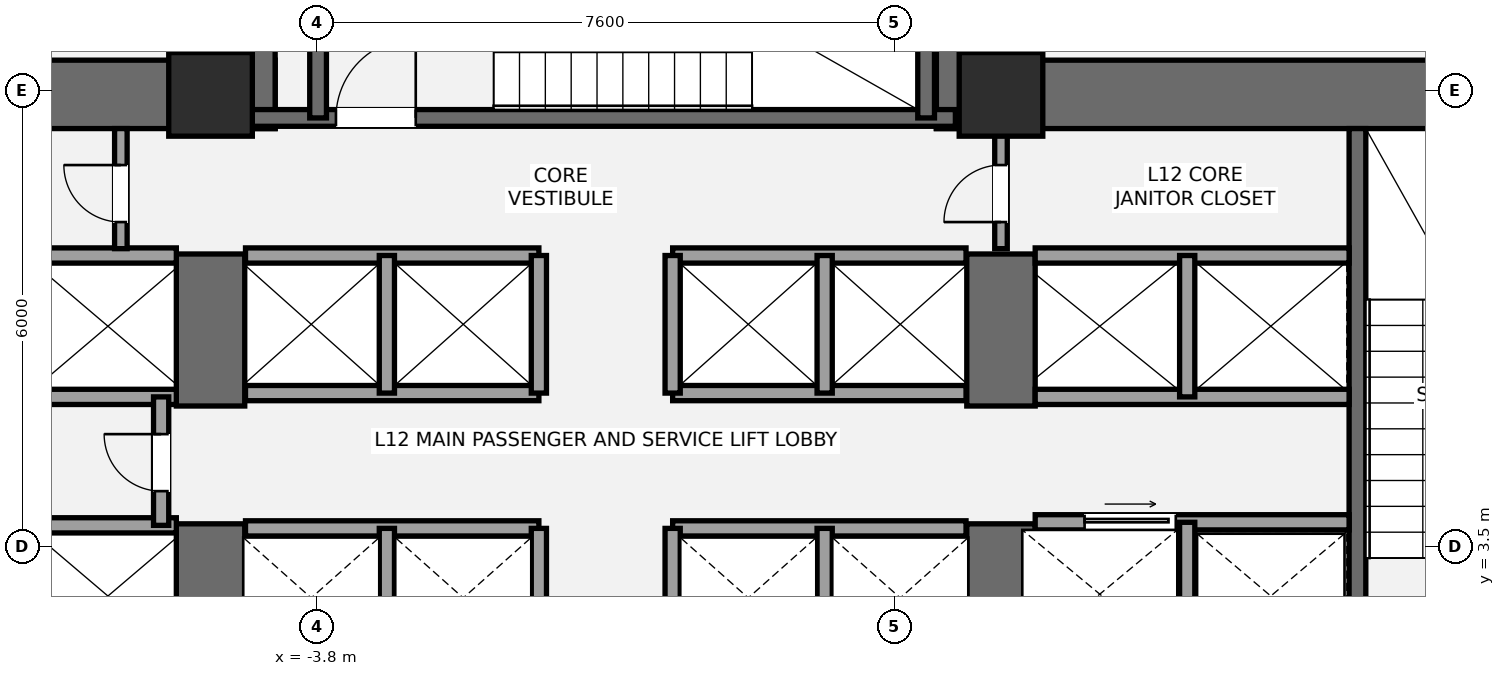
"""IFC4 building model, lengths in metres.
Left out: names, types, materials, properties, quantities, classifications, styles, units other than length and angle.
Written with IfcOpenShell. Run it as: python <this file> out.ifc"""

import sys

from ifc_helpers import new_model, si_unit, direction, frame, frame_2d, origin, origin_2d, place, context, subcontext, project, spatial, rectangle, extrude, element, fill, save


model = new_model("IFC4")
c1 = context("Model", 3, precision=1e-05, world=origin(), true_north=direction((0.0, 1.0)))
c2 = subcontext(c1, "Body", "Model", "MODEL_VIEW")
j1 = project(units=[si_unit("LENGTHUNIT", "METRE"), si_unit("PLANEANGLEUNIT", "RADIAN")], contexts=[c1])
p1 = place(None, origin())
s1 = spatial("IfcSite", under=j1, at=p1, CompositionType="ELEMENT")
p2 = place(p1, origin())
s2 = spatial("IfcBuilding", under=s1, at=p2, CompositionType="ELEMENT")
p3 = place(p2, frame((0.0, 0.0, 48.6)))
s3 = spatial("IfcBuildingStorey", under=s2, at=p3, CompositionType="ELEMENT", Elevation=48.6)
p4 = place(p3, frame((-14.05, 9.45, 0.0), z_axis=(0.0, 0.0, 1.0), x_axis=(1.0, 0.0, 0.0)))
e1 = element("IfcWall", 1, at=p4, inside=s3, PredefinedType="SHEAR", context=c2, shape_type="SweptSolid", body=[
    extrude(rectangle(XDim=9.7, YDim=0.9, at=frame_2d((4.85, 0.0))), origin(), (0.0, 0.0, 1.0), 3.6),
])
p5 = place(p3, frame((-5.2, 0.95, 0.0), z_axis=(0.0, 0.0, 1.0), x_axis=(0.0, 1.0, 0.0)))
e2 = element("IfcWall", 2, at=p5, inside=s3, PredefinedType="SHEAR", context=c2, shape_type="SweptSolid", body=[
    extrude(rectangle(XDim=2.85, YDim=0.9, at=frame_2d((1.425, 0.0))), origin(), (0.0, 0.0, 1.0), 3.6),
])
p6 = place(p3, frame((-5.2, 5.35, 0.0), z_axis=(0.0, 0.0, 1.0), x_axis=(0.0, 1.0, 0.0)))
e3 = element("IfcWall", 3, at=p6, inside=s3, PredefinedType="SHEAR", context=c2, shape_type="SweptSolid", body=[
    extrude(rectangle(XDim=2.0, YDim=0.9, at=frame_2d((1.0, 0.0))), origin(), (0.0, 0.0, 1.0), 3.6),
])
p7 = place(p3, frame((4.35, 9.45, 0.0), z_axis=(0.0, 0.0, 1.0), x_axis=(1.0, 0.0, 0.0)))
e4 = element("IfcWall", 4, at=p7, inside=s3, PredefinedType="SHEAR", context=c2, shape_type="SweptSolid", body=[
    extrude(rectangle(XDim=9.7, YDim=0.9, at=frame_2d((4.85, 0.0))), origin(), (0.0, 0.0, 1.0), 3.6),
])
p8 = place(p3, frame((5.2, 0.95, 0.0), z_axis=(0.0, 0.0, 1.0), x_axis=(0.0, 1.0, 0.0)))
e5 = element("IfcWall", 5, at=p8, inside=s3, PredefinedType="SHEAR", context=c2, shape_type="SweptSolid", body=[
    extrude(rectangle(XDim=2.85, YDim=0.9, at=frame_2d((1.425, 0.0))), origin(), (0.0, 0.0, 1.0), 3.6),
])
p9 = place(p3, frame((5.2, 5.35, 0.0), z_axis=(0.0, 0.0, 1.0), x_axis=(0.0, 1.0, 0.0)))
e6 = element("IfcWall", 6, at=p9, inside=s3, PredefinedType="SHEAR", context=c2, shape_type="SweptSolid", body=[
    extrude(rectangle(XDim=2.0, YDim=0.9, at=frame_2d((1.0, 0.0))), origin(), (0.0, 0.0, 1.0), 3.6),
])
p10 = place(p3, frame((9.89, 1.85, 0.0), z_axis=(0.0, 0.0, 1.0), x_axis=(0.0, 1.0, 0.0)))
e7 = element("IfcWall", 7, at=p10, inside=s3, PredefinedType="SHEAR", context=c2, shape_type="SweptSolid", body=[
    extrude(rectangle(XDim=7.15, YDim=0.22, at=frame_2d((3.575, 0.0))), origin(), (0.0, 0.0, 1.0), 3.6),
])
for number, where, z_axis, x_axis in (
    (8, (-4.8, 9.0, 0.0), (0.0, 0.0, 1.0), (0.0, 1.0, 0.0)),
    (9, (4.8, 9.0, 0.0), (0.0, 0.0, 1.0), (0.0, 1.0, 0.0)),
):
    element("IfcWall", number, at=place(p3, frame(where, z_axis=z_axis, x_axis=x_axis)), inside=s3, PredefinedType="SHEAR", context=c2, shape_type="SweptSolid", body=[
        extrude(rectangle(XDim=4.3, YDim=0.9, at=frame_2d((2.15, 0.0))), origin(), (0.0, 0.0, 1.0), 3.6),
    ])
p11 = place(p3, frame((-4.7, 9.14, 0.0), z_axis=(0.0, 0.0, 1.0), x_axis=(1.0, 0.0, 0.0)))
e10 = element("IfcWall", 10, at=p11, inside=s3, PredefinedType="SHEAR", context=c2, shape_type="SweptSolid", body=[
    extrude(rectangle(XDim=9.3, YDim=0.22, at=frame_2d((4.65, 0.0))), origin(), (0.0, 0.0, 1.0), 3.6),
])
p12 = place(p11, frame((1.15, 0.0, 0.0)))
e11 = element("IfcOpeningElement", 11, at=p12, cuts=e10, PredefinedType="OPENING", context=c2, shape_type="SweptSolid", body=[
    extrude(rectangle(XDim=1.05, YDim=2.15, at=frame_2d((0.525, 1.075))), frame((0.0, 0.12, 0.0), z_axis=(0.0, -1.0, 0.0), x_axis=(1.0, 0.0, 0.0)), (0.0, 0.0, 1.0), 0.24),
])
for number, where, z_axis, x_axis in (
    (12, (-3.785, 9.14, 0.0), (0.0, 0.0, 1.0), (0.0, 1.0, 0.0)),
    (13, (4.215, 9.14, 0.0), (0.0, 0.0, 1.0), (0.0, 1.0, 0.0)),
):
    element("IfcWall", number, at=place(p3, frame(where, z_axis=z_axis, x_axis=x_axis)), inside=s3, PredefinedType="SHEAR", context=c2, shape_type="SweptSolid", body=[
        extrude(rectangle(XDim=3.26, YDim=0.22, at=frame_2d((1.63, 0.0))), origin(), (0.0, 0.0, 1.0), 3.6),
    ])
for number, where, z_axis, x_axis in (
    (14, (-5.2, 9.45, 0.0), (0.0, 0.0, 1.0), (1.0, 0.0, 0.0)),
    (15, (5.2, 9.45, 0.0), (0.0, 0.0, 1.0), (1.0, 0.0, 0.0)),
):
    element("IfcColumn", number, at=place(p3, frame(where, z_axis=z_axis, x_axis=x_axis)), inside=s3, PredefinedType="COLUMN", context=c2, shape_type="SweptSolid", body=[
        extrude(rectangle(XDim=1.1, YDim=1.1, at=origin_2d()), origin(), (0.0, 0.0, 1.0), 3.6),
    ])
for number, where, z_axis, x_axis in (
    (16, (-9.78, 3.78, 0.0), (0.0, 0.0, 1.0), (1.0, 0.0, 0.0)),
    (17, (-9.78, 5.47, 0.0), (0.0, 0.0, 1.0), (1.0, 0.0, 0.0)),
    (18, (-9.78, 7.33, 0.0), (0.0, 0.0, 1.0), (1.0, 0.0, 0.0)),
):
    element("IfcWall", number, at=place(p3, frame(where, z_axis=z_axis, x_axis=x_axis)), inside=s3, PredefinedType="SOLIDWALL", context=c2, shape_type="SweptSolid", body=[
        extrude(rectangle(XDim=4.13, YDim=0.2, at=frame_2d((2.065, 0.0))), origin(), (0.0, 0.0, 1.0), 3.4),
    ])
p13 = place(p3, frame((-5.85, 3.78, 0.0), z_axis=(0.0, 0.0, 1.0), x_axis=(0.0, 1.0, 0.0)))
e19 = element("IfcWall", 19, at=p13, inside=s3, PredefinedType="SOLIDWALL", context=c2, shape_type="SweptSolid", body=[
    extrude(rectangle(XDim=1.69, YDim=0.2, at=frame_2d((0.845, 0.0))), origin(), (0.0, 0.0, 1.0), 3.4),
])
p14 = place(p13, frame((0.45, 0.0, 0.0)))
e20 = element("IfcOpeningElement", 20, at=p14, cuts=e19, PredefinedType="OPENING", context=c2, shape_type="SweptSolid", body=[
    extrude(rectangle(XDim=0.75, YDim=2.1, at=frame_2d((0.375, 1.05))), frame((0.0, 0.11, 0.0), z_axis=(0.0, -1.0, 0.0), x_axis=(1.0, 0.0, 0.0)), (0.0, 0.0, 1.0), 0.22),
])
p15 = place(p3, frame((5.65, 3.82, 0.0), z_axis=(0.0, 0.0, 1.0), x_axis=(1.0, 0.0, 0.0)))
e21 = element("IfcWall", 21, at=p15, inside=s3, PredefinedType="SOLIDWALL", context=c2, shape_type="SweptSolid", body=[
    extrude(rectangle(XDim=4.13, YDim=0.2, at=frame_2d((2.065, 0.0))), origin(), (0.0, 0.0, 1.0), 3.4),
])
p16 = place(p15, frame((0.65, 0.0, 0.0)))
e22 = element("IfcOpeningElement", 22, at=p16, cuts=e21, PredefinedType="OPENING", context=c2, shape_type="SweptSolid", body=[
    extrude(rectangle(XDim=1.2, YDim=2.2, at=frame_2d((0.6, 1.1))), frame((0.0, 0.11, 0.0), z_axis=(0.0, -1.0, 0.0), x_axis=(1.0, 0.0, 0.0)), (0.0, 0.0, 1.0), 0.22),
])
p17 = place(p3, frame((7.65, 1.85, 0.0), z_axis=(0.0, 0.0, 1.0), x_axis=(0.0, 1.0, 0.0)))
e23 = element("IfcWall", 23, at=p17, inside=s3, PredefinedType="SOLIDWALL", context=c2, shape_type="SweptSolid", body=[
    extrude(rectangle(XDim=1.97, YDim=0.2, at=frame_2d((0.985, 0.0))), origin(), (0.0, 0.0, 1.0), 3.4),
])
for number, where, z_axis, x_axis in (
    (24, (5.65, 5.47, 0.0), (0.0, 0.0, 1.0), (1.0, 0.0, 0.0)),
    (25, (5.65, 7.33, 0.0), (0.0, 0.0, 1.0), (1.0, 0.0, 0.0)),
):
    element("IfcWall", number, at=place(p3, frame(where, z_axis=z_axis, x_axis=x_axis)), inside=s3, PredefinedType="SOLIDWALL", context=c2, shape_type="SweptSolid", body=[
        extrude(rectangle(XDim=4.13, YDim=0.2, at=frame_2d((2.065, 0.0))), origin(), (0.0, 0.0, 1.0), 3.4),
    ])
p18 = place(p3, frame((7.65, 5.47, 0.0), z_axis=(0.0, 0.0, 1.0), x_axis=(0.0, 1.0, 0.0)))
e26 = element("IfcWall", 26, at=p18, inside=s3, PredefinedType="SOLIDWALL", context=c2, shape_type="SweptSolid", body=[
    extrude(rectangle(XDim=1.86, YDim=0.2, at=frame_2d((0.93, 0.0))), origin(), (0.0, 0.0, 1.0), 3.4),
])
for number, where, z_axis, x_axis in (
    (27, (-4.74, 3.74, 0.0), (0.0, 0.0, 1.0), (1.0, 0.0, 0.0)),
    (28, (0.88, 3.74, 0.0), (0.0, 0.0, 1.0), (1.0, 0.0, 0.0)),
):
    element("IfcWall", number, at=place(p3, frame(where, z_axis=z_axis, x_axis=x_axis)), inside=s3, PredefinedType="SOLIDWALL", context=c2, shape_type="SweptSolid", body=[
        extrude(rectangle(XDim=3.86, YDim=0.2, at=frame_2d((1.93, 0.0))), origin(), (0.0, 0.0, 1.0), 3.4),
    ])
for number, where, z_axis, x_axis in (
    (29, (-2.88, 1.92, 0.0), (0.0, 0.0, 1.0), (0.0, 1.0, 0.0)),
    (30, (2.88, 1.92, 0.0), (0.0, 0.0, 1.0), (0.0, 1.0, 0.0)),
    (31, (-0.88, 1.92, 0.0), (0.0, 0.0, 1.0), (0.0, 1.0, 0.0)),
    (32, (0.88, 1.92, 0.0), (0.0, 0.0, 1.0), (0.0, 1.0, 0.0)),
):
    element("IfcWall", number, at=place(p3, frame(where, z_axis=z_axis, x_axis=x_axis)), inside=s3, PredefinedType="SOLIDWALL", context=c2, shape_type="SweptSolid", body=[
        extrude(rectangle(XDim=1.82, YDim=0.2, at=frame_2d((0.91, 0.0))), origin(), (0.0, 0.0, 1.0), 3.4),
    ])
for number, where, z_axis, x_axis in (
    (33, (-4.74, 5.52, 0.0), (0.0, 0.0, 1.0), (1.0, 0.0, 0.0)),
    (34, (0.88, 5.52, 0.0), (0.0, 0.0, 1.0), (1.0, 0.0, 0.0)),
    (35, (-4.74, 7.33, 0.0), (0.0, 0.0, 1.0), (1.0, 0.0, 0.0)),
    (36, (0.88, 7.33, 0.0), (0.0, 0.0, 1.0), (1.0, 0.0, 0.0)),
):
    element("IfcWall", number, at=place(p3, frame(where, z_axis=z_axis, x_axis=x_axis)), inside=s3, PredefinedType="SOLIDWALL", context=c2, shape_type="SweptSolid", body=[
        extrude(rectangle(XDim=3.86, YDim=0.2, at=frame_2d((1.93, 0.0))), origin(), (0.0, 0.0, 1.0), 3.4),
    ])
for number, where, z_axis, x_axis in (
    (37, (-2.88, 5.52, 0.0), (0.0, 0.0, 1.0), (0.0, 1.0, 0.0)),
    (38, (2.88, 5.52, 0.0), (0.0, 0.0, 1.0), (0.0, 1.0, 0.0)),
    (39, (-0.88, 5.52, 0.0), (0.0, 0.0, 1.0), (0.0, 1.0, 0.0)),
    (40, (0.88, 5.52, 0.0), (0.0, 0.0, 1.0), (0.0, 1.0, 0.0)),
):
    element("IfcWall", number, at=place(p3, frame(where, z_axis=z_axis, x_axis=x_axis)), inside=s3, PredefinedType="SOLIDWALL", context=c2, shape_type="SweptSolid", body=[
        extrude(rectangle(XDim=1.81, YDim=0.2, at=frame_2d((0.905, 0.0))), origin(), (0.0, 0.0, 1.0), 3.4),
    ])
p19 = place(p3, frame((-6.38, 7.42, 0.0), z_axis=(0.0, 0.0, 1.0), x_axis=(0.0, 1.0, 0.0)))
e41 = element("IfcWall", 41, at=p19, inside=s3, PredefinedType="PARTITIONING", context=c2, shape_type="SweptSolid", body=[
    extrude(rectangle(XDim=1.58, YDim=0.165, at=frame_2d((0.79, 0.0))), origin(), (0.0, 0.0, 1.0), 3.4),
])
p20 = place(p19, frame((0.35, 0.0, 0.0)))
e42 = element("IfcOpeningElement", 42, at=p20, cuts=e41, PredefinedType="OPENING", context=c2, shape_type="SweptSolid", body=[
    extrude(rectangle(XDim=0.75, YDim=2.1, at=frame_2d((0.375, 1.05))), frame((0.0, 0.093, 0.0), z_axis=(0.0, -1.0, 0.0), x_axis=(1.0, 0.0, 0.0)), (0.0, 0.0, 1.0), 0.185),
])
p21 = place(p3, frame((5.2, 7.42, 0.0), z_axis=(0.0, 0.0, 1.0), x_axis=(0.0, 1.0, 0.0)))
e43 = element("IfcWall", 43, at=p21, inside=s3, PredefinedType="PARTITIONING", context=c2, shape_type="SweptSolid", body=[
    extrude(rectangle(XDim=1.58, YDim=0.165, at=frame_2d((0.79, 0.0))), origin(), (0.0, 0.0, 1.0), 3.4),
])
p22 = place(p21, frame((0.35, 0.0, 0.0)))
e44 = element("IfcOpeningElement", 44, at=p22, cuts=e43, PredefinedType="OPENING", context=c2, shape_type="SweptSolid", body=[
    extrude(rectangle(XDim=0.75, YDim=2.1, at=frame_2d((0.375, 1.05))), frame((0.0, 0.093, 0.0), z_axis=(0.0, -1.0, 0.0), x_axis=(1.0, 0.0, 0.0)), (0.0, 0.0, 1.0), 0.185),
])
p23 = place(p12, origin())
e45 = element("IfcDoor", 45, at=p23, inside=s3, OperationType="SINGLE_SWING_RIGHT", PredefinedType="DOOR", context=c2, shape_type="SweptSolid", body=[
    extrude(rectangle(XDim=1.05, YDim=2.15, at=frame_2d((0.525, 1.075))), frame((0.0, 0.025, 0.0), z_axis=(0.0, -1.0, 0.0), x_axis=(1.0, 0.0, 0.0)), (0.0, 0.0, 1.0), 0.05),
])
fill(e11, e45)
p24 = place(p14, origin())
e46 = element("IfcDoor", 46, at=p24, inside=s3, OperationType="SINGLE_SWING_RIGHT", PredefinedType="DOOR", context=c2, shape_type="SweptSolid", body=[
    extrude(rectangle(XDim=0.75, YDim=2.1, at=frame_2d((0.375, 1.05))), frame((0.0, 0.025, 0.0), z_axis=(0.0, -1.0, 0.0), x_axis=(1.0, 0.0, 0.0)), (0.0, 0.0, 1.0), 0.05),
])
fill(e20, e46)
p25 = place(p16, origin())
e47 = element("IfcDoor", 47, at=p25, inside=s3, OperationType="SLIDING_TO_RIGHT", PredefinedType="DOOR", context=c2, shape_type="SweptSolid", body=[
    extrude(rectangle(XDim=1.2, YDim=2.2, at=frame_2d((0.6, 1.1))), frame((0.0, 0.025, 0.0), z_axis=(0.0, -1.0, 0.0), x_axis=(1.0, 0.0, 0.0)), (0.0, 0.0, 1.0), 0.05),
])
fill(e22, e47)
p26 = place(p20, origin())
e48 = element("IfcDoor", 48, at=p26, inside=s3, OperationType="SINGLE_SWING_RIGHT", PredefinedType="DOOR", context=c2, shape_type="SweptSolid", body=[
    extrude(rectangle(XDim=0.75, YDim=2.1, at=frame_2d((0.375, 1.05))), frame((0.0, 0.025, 0.0), z_axis=(0.0, -1.0, 0.0), x_axis=(1.0, 0.0, 0.0)), (0.0, 0.0, 1.0), 0.05),
])
fill(e42, e48)
p27 = place(p22, origin())
e49 = element("IfcDoor", 49, at=p27, inside=s3, OperationType="SINGLE_SWING_LEFT", PredefinedType="DOOR", context=c2, shape_type="SweptSolid", body=[
    extrude(rectangle(XDim=0.75, YDim=2.1, at=frame_2d((0.375, 1.05))), frame((0.0, 0.025, 0.0), z_axis=(0.0, -1.0, 0.0), x_axis=(1.0, 0.0, 0.0)), (0.0, 0.0, 1.0), 0.05),
])
fill(e44, e49)
save(model, sys.argv[1])
